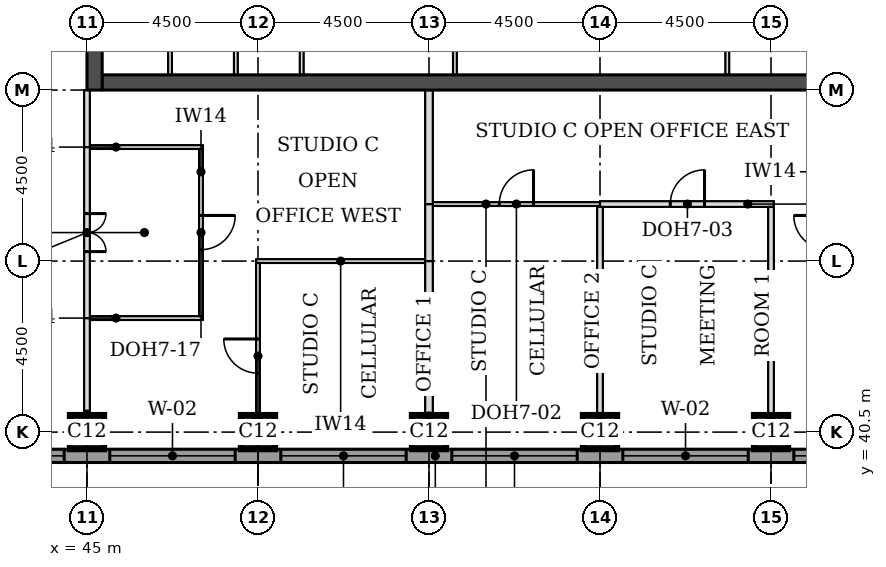
"""IFC4 building model, lengths in metres.
Left out: names, types, materials, properties, quantities, classifications, styles, units other than length and angle.
Written with IfcOpenShell. Run it as: python <this file> out.ifc"""

import sys

from ifc_helpers import new_model, si_unit, direction, frame, frame_2d, origin, origin_2d, place, context, subcontext, project, spatial, rectangle, extrude, element, fill, save


model = new_model("IFC4")
c1 = context("Model", 3, precision=1e-05, world=origin(), true_north=direction((0.0, 1.0)))
c2 = subcontext(c1, "Body", "Model", "MODEL_VIEW")
j1 = project(units=[si_unit("LENGTHUNIT", "METRE"), si_unit("PLANEANGLEUNIT", "RADIAN")], contexts=[c1])
p1 = place(None, origin())
s1 = spatial("IfcSite", under=j1, at=p1, CompositionType="ELEMENT")
p2 = place(p1, origin())
s2 = spatial("IfcBuilding", under=s1, at=p2, CompositionType="ELEMENT")
p3 = place(p2, frame((0.0, 0.0, 192.1)))
s3 = spatial("IfcBuildingStorey", under=s2, at=p3, CompositionType="ELEMENT", Elevation=192.1)
for number, where, z_axis, x_axis in (
    (1, (45.0, 40.5, 0.0), (0.0, 0.0, 1.0), (1.0, 0.0, 0.0)),
    (2, (49.5, 40.5, 0.0), (0.0, 0.0, 1.0), (1.0, 0.0, 0.0)),
    (3, (54.0, 40.5, 0.0), (0.0, 0.0, 1.0), (1.0, 0.0, 0.0)),
    (4, (58.5, 40.5, 0.0), (0.0, 0.0, 1.0), (1.0, 0.0, 0.0)),
    (5, (63.0, 40.5, 0.0), (0.0, 0.0, 1.0), (1.0, 0.0, 0.0)),
):
    element("IfcColumn", number, at=place(p3, frame(where, z_axis=z_axis, x_axis=x_axis)), inside=s3, PredefinedType="COLUMN", context=c2, shape_type="SweptSolid", body=[
        extrude(rectangle(XDim=0.9, YDim=0.9, at=origin_2d()), origin(), (0.0, 0.0, 1.0), 3.7),
    ])
p4 = place(p3, frame((45.4, 49.7, 0.0), z_axis=(0.0, 0.0, 1.0), x_axis=(1.0, 0.0, 0.0)))
e6 = element("IfcWall", 6, at=p4, inside=s3, PredefinedType="SHEAR", context=c2, shape_type="SweptSolid", body=[
    extrude(rectangle(XDim=21.7, YDim=0.4, at=frame_2d((10.85, 0.0))), origin(), (0.0, 0.0, 1.0), 3.7),
])
p5 = place(p3, frame((45.2, 49.5, 0.0), z_axis=(0.0, 0.0, 1.0), x_axis=(0.0, 1.0, 0.0)))
e7 = element("IfcWall", 7, at=p5, inside=s3, PredefinedType="SHEAR", context=c2, shape_type="SweptSolid", body=[
    extrude(rectangle(XDim=22.5, YDim=0.4, at=frame_2d((11.25, 0.0))), origin(), (0.0, 0.0, 1.0), 3.7),
])
p6 = place(p5, frame((4.2, 0.0, 0.0)))
e8 = element("IfcOpeningElement", 8, at=p6, cuts=e7, PredefinedType="OPENING", context=c2, shape_type="SweptSolid", body=[
    extrude(rectangle(XDim=1.8, YDim=2.1, at=frame_2d((0.9, 1.05))), frame((0.0, 0.21, 0.0), z_axis=(0.0, -1.0, 0.0), x_axis=(1.0, 0.0, 0.0)), (0.0, 0.0, 1.0), 0.42),
])
p7 = place(p5, frame((6.9, 0.0, 0.0)))
e9 = element("IfcOpeningElement", 9, at=p7, cuts=e7, PredefinedType="OPENING", context=c2, shape_type="SweptSolid", body=[
    extrude(rectangle(XDim=1.1, YDim=2.1, at=frame_2d((0.55, 1.05))), frame((0.0, 0.21, 0.0), z_axis=(0.0, -1.0, 0.0), x_axis=(1.0, 0.0, 0.0)), (0.0, 0.0, 1.0), 0.42),
])
p8 = place(p5, frame((13.6, 0.0, 0.0)))
e10 = element("IfcOpeningElement", 10, at=p8, cuts=e7, PredefinedType="OPENING", context=c2, shape_type="SweptSolid", body=[
    extrude(rectangle(XDim=1.1, YDim=2.1, at=frame_2d((0.55, 1.05))), frame((0.0, 0.21, 0.0), z_axis=(0.0, -1.0, 0.0), x_axis=(1.0, 0.0, 0.0)), (0.0, 0.0, 1.0), 0.42),
])
p9 = place(p5, frame((16.5, 0.0, 0.0)))
e11 = element("IfcOpeningElement", 11, at=p9, cuts=e7, PredefinedType="OPENING", context=c2, shape_type="SweptSolid", body=[
    extrude(rectangle(XDim=1.8, YDim=2.1, at=frame_2d((0.9, 1.05))), frame((0.0, 0.21, 0.0), z_axis=(0.0, -1.0, 0.0), x_axis=(1.0, 0.0, 0.0)), (0.0, 0.0, 1.0), 0.42),
])
p10 = place(p3, frame((36.0, 39.875, 0.0), z_axis=(0.0, 0.0, 1.0), x_axis=(1.0, 0.0, 0.0)))
e12 = element("IfcWall", 12, at=p10, inside=s3, PredefinedType="STANDARD", context=c2, shape_type="SweptSolid", body=[
    extrude(rectangle(XDim=36.331, YDim=0.35, at=frame_2d((18.166, 0.0))), origin(), (0.0, 0.0, 1.0), 3.525),
])
p11 = place(p10, frame((5.1, 0.0, 0.9)))
e13 = element("IfcOpeningElement", 13, at=p11, cuts=e12, PredefinedType="OPENING", context=c2, shape_type="SweptSolid", body=[
    extrude(rectangle(XDim=3.3, YDim=1.9, at=frame_2d((1.65, 0.95))), frame((0.0, 0.185, 0.0), z_axis=(0.0, -1.0, 0.0), x_axis=(1.0, 0.0, 0.0)), (0.0, 0.0, 1.0), 0.37),
])
p12 = place(p10, frame((9.6, 0.0, 0.9)))
e14 = element("IfcOpeningElement", 14, at=p12, cuts=e12, PredefinedType="OPENING", context=c2, shape_type="SweptSolid", body=[
    extrude(rectangle(XDim=3.3, YDim=1.9, at=frame_2d((1.65, 0.95))), frame((0.0, 0.185, 0.0), z_axis=(0.0, -1.0, 0.0), x_axis=(1.0, 0.0, 0.0)), (0.0, 0.0, 1.0), 0.37),
])
p13 = place(p10, frame((14.1, 0.0, 0.9)))
e15 = element("IfcOpeningElement", 15, at=p13, cuts=e12, PredefinedType="OPENING", context=c2, shape_type="SweptSolid", body=[
    extrude(rectangle(XDim=3.3, YDim=1.9, at=frame_2d((1.65, 0.95))), frame((0.0, 0.185, 0.0), z_axis=(0.0, -1.0, 0.0), x_axis=(1.0, 0.0, 0.0)), (0.0, 0.0, 1.0), 0.37),
])
p14 = place(p10, frame((18.6, 0.0, 0.9)))
e16 = element("IfcOpeningElement", 16, at=p14, cuts=e12, PredefinedType="OPENING", context=c2, shape_type="SweptSolid", body=[
    extrude(rectangle(XDim=3.3, YDim=1.9, at=frame_2d((1.65, 0.95))), frame((0.0, 0.185, 0.0), z_axis=(0.0, -1.0, 0.0), x_axis=(1.0, 0.0, 0.0)), (0.0, 0.0, 1.0), 0.37),
])
p15 = place(p10, frame((23.1, 0.0, 0.9)))
e17 = element("IfcOpeningElement", 17, at=p15, cuts=e12, PredefinedType="OPENING", context=c2, shape_type="SweptSolid", body=[
    extrude(rectangle(XDim=3.3, YDim=1.9, at=frame_2d((1.65, 0.95))), frame((0.0, 0.185, 0.0), z_axis=(0.0, -1.0, 0.0), x_axis=(1.0, 0.0, 0.0)), (0.0, 0.0, 1.0), 0.37),
])
p16 = place(p10, frame((27.6, 0.0, 0.9)))
e18 = element("IfcOpeningElement", 18, at=p16, cuts=e12, PredefinedType="OPENING", context=c2, shape_type="SweptSolid", body=[
    extrude(rectangle(XDim=3.3, YDim=1.9, at=frame_2d((1.65, 0.95))), frame((0.0, 0.185, 0.0), z_axis=(0.0, -1.0, 0.0), x_axis=(1.0, 0.0, 0.0)), (0.0, 0.0, 1.0), 0.37),
])
p17 = place(p3, frame((45.075, 43.5, 0.0), z_axis=(0.0, 0.0, 1.0), x_axis=(1.0, 0.0, 0.0)))
e19 = element("IfcWall", 19, at=p17, inside=s3, PredefinedType="PARTITIONING", context=c2, shape_type="SweptSolid", body=[
    extrude(rectangle(XDim=2.975, YDim=0.1, at=frame_2d((1.488, 0.0))), origin(), (0.0, 0.0, 1.0), 3.55),
])
p18 = place(p3, frame((49.45, 45.0, 0.0), z_axis=(0.0, 0.0, 1.0), x_axis=(1.0, 0.0, 0.0)))
e20 = element("IfcWall", 20, at=p18, inside=s3, PredefinedType="PARTITIONING", context=c2, shape_type="SweptSolid", body=[
    extrude(rectangle(XDim=4.45, YDim=0.1, at=frame_2d((2.225, 0.0))), origin(), (0.0, 0.0, 1.0), 3.55),
])
p19 = place(p3, frame((54.1, 46.5, 0.0), z_axis=(0.0, 0.0, 1.0), x_axis=(1.0, 0.0, 0.0)))
e21 = element("IfcWall", 21, at=p19, inside=s3, PredefinedType="PARTITIONING", context=c2, shape_type="SweptSolid", body=[
    extrude(rectangle(XDim=4.4, YDim=0.1, at=frame_2d((2.2, 0.0))), origin(), (0.0, 0.0, 1.0), 3.55),
])
p20 = place(p19, frame((1.75, 0.0, 0.0)))
e22 = element("IfcOpeningElement", 22, at=p20, cuts=e21, PredefinedType="OPENING", context=c2, shape_type="SweptSolid", body=[
    extrude(rectangle(XDim=0.9, YDim=2.1, at=frame_2d((0.45, 1.05))), frame((0.0, 0.06, 0.0), z_axis=(0.0, -1.0, 0.0), x_axis=(1.0, 0.0, 0.0)), (0.0, 0.0, 1.0), 0.12),
])
p21 = place(p3, frame((58.5, 46.5, 0.0), z_axis=(0.0, 0.0, 1.0), x_axis=(1.0, 0.0, 0.0)))
e23 = element("IfcWall", 23, at=p21, inside=s3, PredefinedType="PARTITIONING", context=c2, shape_type="SweptSolid", body=[
    extrude(rectangle(XDim=4.575, YDim=0.15, at=frame_2d((2.288, 0.0))), origin(), (0.0, 0.0, 1.0), 3.55),
])
p22 = place(p21, frame((1.85, 0.0, 0.0)))
e24 = element("IfcOpeningElement", 24, at=p22, cuts=e23, PredefinedType="OPENING", context=c2, shape_type="SweptSolid", body=[
    extrude(rectangle(XDim=0.9, YDim=2.1, at=frame_2d((0.45, 1.05))), frame((0.0, 0.085, 0.0), z_axis=(0.0, -1.0, 0.0), x_axis=(1.0, 0.0, 0.0)), (0.0, 0.0, 1.0), 0.17),
])
p23 = place(p3, frame((45.075, 48.0, 0.0), z_axis=(0.0, 0.0, 1.0), x_axis=(1.0, 0.0, 0.0)))
e25 = element("IfcWall", 25, at=p23, inside=s3, PredefinedType="PARTITIONING", context=c2, shape_type="SweptSolid", body=[
    extrude(rectangle(XDim=2.975, YDim=0.1, at=frame_2d((1.488, 0.0))), origin(), (0.0, 0.0, 1.0), 3.55),
])
p24 = place(p3, frame((45.0, 40.05, 0.0), z_axis=(0.0, 0.0, 1.0), x_axis=(0.0, 1.0, 0.0)))
e26 = element("IfcWall", 26, at=p24, inside=s3, PredefinedType="PARTITIONING", context=c2, shape_type="SweptSolid", body=[
    extrude(rectangle(XDim=3.45, YDim=0.15, at=frame_2d((1.725, 0.0))), origin(), (0.0, 0.0, 1.0), 3.022),
])
p25 = place(p3, frame((49.5, 40.05, 0.0), z_axis=(0.0, 0.0, 1.0), x_axis=(0.0, 1.0, 0.0)))
e27 = element("IfcWall", 27, at=p25, inside=s3, PredefinedType="PARTITIONING", context=c2, shape_type="SweptSolid", body=[
    extrude(rectangle(XDim=4.9, YDim=0.1, at=frame_2d((2.45, 0.0))), origin(), (0.0, 0.0, 1.0), 3.55),
])
p26 = place(p25, frame((2.0, 0.0, 0.0)))
e28 = element("IfcOpeningElement", 28, at=p26, cuts=e27, PredefinedType="OPENING", context=c2, shape_type="SweptSolid", body=[
    extrude(rectangle(XDim=0.9, YDim=2.1, at=frame_2d((0.45, 1.05))), frame((0.0, 0.06, 0.0), z_axis=(0.0, -1.0, 0.0), x_axis=(1.0, 0.0, 0.0)), (0.0, 0.0, 1.0), 0.12),
])
p27 = place(p3, frame((54.0, 40.05, 0.0), z_axis=(0.0, 0.0, 1.0), x_axis=(0.0, 1.0, 0.0)))
e29 = element("IfcWall", 29, at=p27, inside=s3, PredefinedType="PARTITIONING", context=c2, shape_type="SweptSolid", body=[
    extrude(rectangle(XDim=4.95, YDim=0.2, at=frame_2d((2.475, 0.0))), origin(), (0.0, 0.0, 1.0), 3.55),
])
for number, where, z_axis, x_axis in (
    (30, (58.5, 40.05, 0.0), (0.0, 0.0, 1.0), (0.0, 1.0, 0.0)),
    (31, (63.0, 40.05, 0.0), (0.0, 0.0, 1.0), (0.0, 1.0, 0.0)),
):
    element("IfcWall", number, at=place(p3, frame(where, z_axis=z_axis, x_axis=x_axis)), inside=s3, PredefinedType="PARTITIONING", context=c2, shape_type="SweptSolid", body=[
        extrude(rectangle(XDim=6.375, YDim=0.15, at=frame_2d((3.188, 0.0))), origin(), (0.0, 0.0, 1.0), 3.55),
    ])
p28 = place(p3, frame((45.0, 43.5, 0.0), z_axis=(0.0, 0.0, 1.0), x_axis=(0.0, 1.0, 0.0)))
e32 = element("IfcWall", 32, at=p28, inside=s3, PredefinedType="PARTITIONING", context=c2, shape_type="SweptSolid", body=[
    extrude(rectangle(XDim=4.5, YDim=0.15, at=frame_2d((2.25, 0.0))), origin(), (0.0, 0.0, 1.0), 3.022),
])
p29 = place(p28, frame((1.75, 0.0, 0.0)))
e33 = element("IfcOpeningElement", 33, at=p29, cuts=e32, PredefinedType="OPENING", context=c2, shape_type="SweptSolid", body=[
    extrude(rectangle(XDim=1.0, YDim=2.1, at=frame_2d((0.5, 1.05))), frame((0.0, 0.085, 0.0), z_axis=(0.0, -1.0, 0.0), x_axis=(1.0, 0.0, 0.0)), (0.0, 0.0, 1.0), 0.17),
])
p30 = place(p3, frame((48.0, 43.55, 0.0), z_axis=(0.0, 0.0, 1.0), x_axis=(0.0, 1.0, 0.0)))
e34 = element("IfcWall", 34, at=p30, inside=s3, PredefinedType="PARTITIONING", context=c2, shape_type="SweptSolid", body=[
    extrude(rectangle(XDim=4.4, YDim=0.1, at=frame_2d((2.2, 0.0))), origin(), (0.0, 0.0, 1.0), 3.55),
])
p31 = place(p30, frame((1.75, 0.0, 0.0)))
e35 = element("IfcOpeningElement", 35, at=p31, cuts=e34, PredefinedType="OPENING", context=c2, shape_type="SweptSolid", body=[
    extrude(rectangle(XDim=0.9, YDim=2.1, at=frame_2d((0.45, 1.05))), frame((0.0, 0.06, 0.0), z_axis=(0.0, -1.0, 0.0), x_axis=(1.0, 0.0, 0.0)), (0.0, 0.0, 1.0), 0.12),
])
p32 = place(p3, frame((54.0, 45.0, 0.0), z_axis=(0.0, 0.0, 1.0), x_axis=(0.0, 1.0, 0.0)))
e36 = element("IfcWall", 36, at=p32, inside=s3, PredefinedType="PARTITIONING", context=c2, shape_type="SweptSolid", body=[
    extrude(rectangle(XDim=1.5, YDim=0.2, at=frame_2d((0.75, 0.0))), origin(), (0.0, 0.0, 1.0), 3.55),
])
p33 = place(p3, frame((54.0, 46.5, 0.0), z_axis=(0.0, 0.0, 1.0), x_axis=(0.0, 1.0, 0.0)))
e37 = element("IfcWall", 37, at=p33, inside=s3, PredefinedType="PARTITIONING", context=c2, shape_type="SweptSolid", body=[
    extrude(rectangle(XDim=3.0, YDim=0.2, at=frame_2d((1.5, 0.0))), origin(), (0.0, 0.0, 1.0), 3.55),
])
p34 = place(p3, frame((45.0, 48.0, 0.0), z_axis=(0.0, 0.0, 1.0), x_axis=(0.0, 1.0, 0.0)))
e38 = element("IfcWall", 38, at=p34, inside=s3, PredefinedType="PARTITIONING", context=c2, shape_type="SweptSolid", body=[
    extrude(rectangle(XDim=1.5, YDim=0.15, at=frame_2d((0.75, 0.0))), origin(), (0.0, 0.0, 1.0), 3.022),
])
for number, where, z_axis, x_axis in (
    (39, (47.185, 49.9, 0.0), (0.0, 0.0, 1.0), (0.0, 1.0, 0.0)),
    (40, (48.917, 49.9, 0.0), (0.0, 0.0, 1.0), (0.0, 1.0, 0.0)),
    (41, (50.65, 49.9, 0.0), (0.0, 0.0, 1.0), (0.0, 1.0, 0.0)),
    (42, (54.682, 49.9, 0.0), (0.0, 0.0, 1.0), (0.0, 1.0, 0.0)),
    (43, (61.85, 49.9, 0.0), (0.0, 0.0, 1.0), (0.0, 1.0, 0.0)),
):
    element("IfcWall", number, at=place(p3, frame(where, z_axis=z_axis, x_axis=x_axis)), inside=s3, PredefinedType="PARTITIONING", context=c2, shape_type="SweptSolid", body=[
        extrude(rectangle(XDim=3.1, YDim=0.1, at=frame_2d((1.55, 0.0))), origin(), (0.0, 0.0, 1.0), 3.55),
    ])
p35 = place(p11, origin())
e44 = element("IfcWindow", 44, at=p35, inside=s3, PartitioningType="SINGLE_PANEL", PredefinedType="WINDOW", context=c2, shape_type="SweptSolid", body=[
    extrude(rectangle(XDim=3.3, YDim=1.9, at=frame_2d((1.65, 0.95))), frame((0.0, 0.085, 0.0), z_axis=(0.0, -1.0, 0.0), x_axis=(1.0, 0.0, 0.0)), (0.0, 0.0, 1.0), 0.06),
])
fill(e13, e44)
p36 = place(p12, origin())
e45 = element("IfcWindow", 45, at=p36, inside=s3, PartitioningType="SINGLE_PANEL", PredefinedType="WINDOW", context=c2, shape_type="SweptSolid", body=[
    extrude(rectangle(XDim=3.3, YDim=1.9, at=frame_2d((1.65, 0.95))), frame((0.0, 0.085, 0.0), z_axis=(0.0, -1.0, 0.0), x_axis=(1.0, 0.0, 0.0)), (0.0, 0.0, 1.0), 0.06),
])
fill(e14, e45)
p37 = place(p13, origin())
e46 = element("IfcWindow", 46, at=p37, inside=s3, PartitioningType="SINGLE_PANEL", PredefinedType="WINDOW", context=c2, shape_type="SweptSolid", body=[
    extrude(rectangle(XDim=3.3, YDim=1.9, at=frame_2d((1.65, 0.95))), frame((0.0, 0.085, 0.0), z_axis=(0.0, -1.0, 0.0), x_axis=(1.0, 0.0, 0.0)), (0.0, 0.0, 1.0), 0.06),
])
fill(e15, e46)
p38 = place(p14, origin())
e47 = element("IfcWindow", 47, at=p38, inside=s3, PartitioningType="SINGLE_PANEL", PredefinedType="WINDOW", context=c2, shape_type="SweptSolid", body=[
    extrude(rectangle(XDim=3.3, YDim=1.9, at=frame_2d((1.65, 0.95))), frame((0.0, 0.085, 0.0), z_axis=(0.0, -1.0, 0.0), x_axis=(1.0, 0.0, 0.0)), (0.0, 0.0, 1.0), 0.06),
])
fill(e16, e47)
p39 = place(p15, origin())
e48 = element("IfcWindow", 48, at=p39, inside=s3, PartitioningType="SINGLE_PANEL", PredefinedType="WINDOW", context=c2, shape_type="SweptSolid", body=[
    extrude(rectangle(XDim=3.3, YDim=1.9, at=frame_2d((1.65, 0.95))), frame((0.0, 0.085, 0.0), z_axis=(0.0, -1.0, 0.0), x_axis=(1.0, 0.0, 0.0)), (0.0, 0.0, 1.0), 0.06),
])
fill(e17, e48)
p40 = place(p16, origin())
e49 = element("IfcWindow", 49, at=p40, inside=s3, PartitioningType="SINGLE_PANEL", PredefinedType="WINDOW", context=c2, shape_type="SweptSolid", body=[
    extrude(rectangle(XDim=3.3, YDim=1.9, at=frame_2d((1.65, 0.95))), frame((0.0, 0.085, 0.0), z_axis=(0.0, -1.0, 0.0), x_axis=(1.0, 0.0, 0.0)), (0.0, 0.0, 1.0), 0.06),
])
fill(e18, e49)
p41 = place(p29, frame((1.0, 0.0, 0.0), z_axis=(0.0, 0.0, 1.0), x_axis=(-1.0, 0.0, 0.0)))
e50 = element("IfcDoor", 50, at=p41, inside=s3, OperationType="DOUBLE_DOOR_SINGLE_SWING", PredefinedType="DOOR", context=c2, shape_type="SweptSolid", body=[
    extrude(rectangle(XDim=1.0, YDim=2.1, at=frame_2d((0.5, 1.05))), frame((0.0, 0.025, 0.0), z_axis=(0.0, -1.0, 0.0), x_axis=(1.0, 0.0, 0.0)), (0.0, 0.0, 1.0), 0.05),
])
fill(e33, e50)
p42 = place(p31, frame((0.9, 0.0, 0.0), z_axis=(0.0, 0.0, 1.0), x_axis=(-1.0, 0.0, 0.0)))
e51 = element("IfcDoor", 51, at=p42, inside=s3, OperationType="SINGLE_SWING_LEFT", PredefinedType="DOOR", context=c2, shape_type="SweptSolid", body=[
    extrude(rectangle(XDim=0.9, YDim=2.1, at=frame_2d((0.45, 1.05))), frame((0.0, 0.025, 0.0), z_axis=(0.0, -1.0, 0.0), x_axis=(1.0, 0.0, 0.0)), (0.0, 0.0, 1.0), 0.05),
])
fill(e35, e51)
p43 = place(p26, origin())
e52 = element("IfcDoor", 52, at=p43, inside=s3, OperationType="SINGLE_SWING_RIGHT", PredefinedType="DOOR", context=c2, shape_type="SweptSolid", body=[
    extrude(rectangle(XDim=0.9, YDim=2.1, at=frame_2d((0.45, 1.05))), frame((0.0, 0.025, 0.0), z_axis=(0.0, -1.0, 0.0), x_axis=(1.0, 0.0, 0.0)), (0.0, 0.0, 1.0), 0.05),
])
fill(e28, e52)
p44 = place(p20, origin())
e53 = element("IfcDoor", 53, at=p44, inside=s3, OperationType="SINGLE_SWING_RIGHT", PredefinedType="DOOR", context=c2, shape_type="SweptSolid", body=[
    extrude(rectangle(XDim=0.9, YDim=2.1, at=frame_2d((0.45, 1.05))), frame((0.0, 0.025, 0.0), z_axis=(0.0, -1.0, 0.0), x_axis=(1.0, 0.0, 0.0)), (0.0, 0.0, 1.0), 0.05),
])
fill(e22, e53)
p45 = place(p22, origin())
e54 = element("IfcDoor", 54, at=p45, inside=s3, OperationType="SINGLE_SWING_RIGHT", PredefinedType="DOOR", context=c2, shape_type="SweptSolid", body=[
    extrude(rectangle(XDim=0.9, YDim=2.1, at=frame_2d((0.45, 1.05))), frame((0.0, 0.025, 0.0), z_axis=(0.0, -1.0, 0.0), x_axis=(1.0, 0.0, 0.0)), (0.0, 0.0, 1.0), 0.05),
])
fill(e24, e54)
save(model, sys.argv[1])
